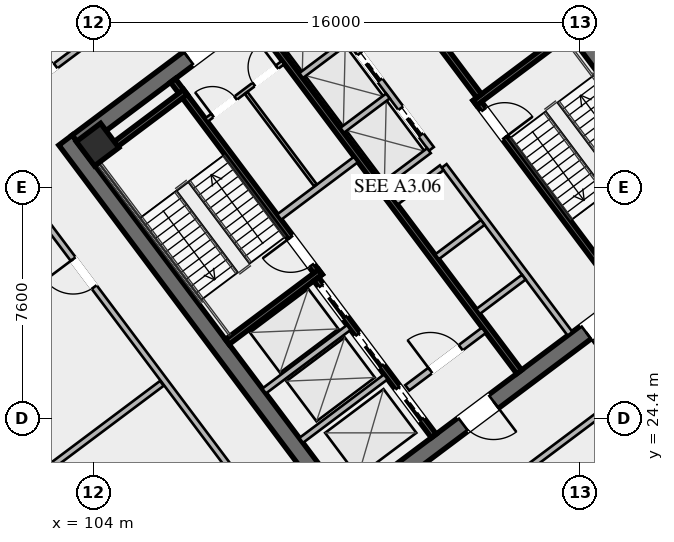
"""IFC4 building model, lengths in metres.
Left out: names, types, materials, properties, quantities, classifications, styles, units other than length and angle.
Written with IfcOpenShell. Run it as: python <this file> out.ifc"""

import sys

from ifc_helpers import new_model, si_unit, direction, frame, frame_2d, origin, origin_2d, place, context, subcontext, project, spatial, rectangle, hollow_rectangle, extrude, element, fill, save


model = new_model("IFC4")
c1 = context("Model", 3, precision=1e-05, world=origin(), true_north=direction((0.0, 1.0)))
c2 = subcontext(c1, "Body", "Model", "MODEL_VIEW")
j1 = project(units=[si_unit("LENGTHUNIT", "METRE"), si_unit("PLANEANGLEUNIT", "RADIAN")], contexts=[c1])
p1 = place(None, origin())
s1 = spatial("IfcSite", under=j1, at=p1, CompositionType="ELEMENT")
p2 = place(p1, origin())
s2 = spatial("IfcBuilding", under=s1, at=p2, CompositionType="ELEMENT")
p3 = place(p2, frame((0.0, 0.0, 109.8)))
s3 = spatial("IfcBuildingStorey", under=s2, at=p3, CompositionType="ELEMENT", Elevation=109.8)
for number, where, z_axis, x_axis in (
    (1, (112.436, 21.077, 0.0), (0.0, 0.0, 1.0), (-0.6, 0.8, 0.0)),
    (2, (115.564, 42.923, 0.0), (0.0, 0.0, 1.0), (0.6, -0.8, 0.0)),
):
    element("IfcWall", number, at=place(p3, frame(where, z_axis=z_axis, x_axis=x_axis)), inside=s3, PredefinedType="SHEAR", context=c2, shape_type="SweptSolid", body=[
        extrude(rectangle(XDim=15.6, YDim=0.55, at=frame_2d((7.8, 0.0))), origin(), (0.0, 0.0, 1.0), 4.6),
    ])
p4 = place(p3, frame((124.539, 30.498, 0.0), z_axis=(0.0, 0.0, 1.0), x_axis=(-0.799998054672, -0.600002593761, 0.0)))
e3 = element("IfcWall", 3, at=p4, inside=s3, PredefinedType="SHEAR", context=c2, shape_type="SweptSolid", body=[
    extrude(rectangle(XDim=15.06, YDim=0.55, at=frame_2d((7.53, 0.0))), origin(), (0.0, 0.0, 1.0), 4.6),
])
p5 = place(p4, frame((9.23, 0.0, 0.0)))
e4 = element("IfcOpeningElement", 4, at=p5, cuts=e3, PredefinedType="OPENING", context=c2, shape_type="SweptSolid", body=[
    extrude(rectangle(XDim=1.25, YDim=2.25, at=frame_2d((0.625, 1.125))), frame((0.0, 0.285, 0.0), z_axis=(0.0, -1.0, 0.0), x_axis=(1.0, 0.0, 0.0)), (0.0, 0.0, 1.0), 0.57),
])
p6 = place(p4, frame((4.18, 0.0, 0.0)))
e5 = element("IfcOpeningElement", 5, at=p6, cuts=e3, PredefinedType="OPENING", context=c2, shape_type="SweptSolid", body=[
    extrude(rectangle(XDim=1.25, YDim=2.25, at=frame_2d((0.625, 1.125))), frame((0.0, 0.285, 0.0), z_axis=(0.0, -1.0, 0.0), x_axis=(1.0, 0.0, 0.0)), (0.0, 0.0, 1.0), 0.57),
])
p7 = place(p3, frame((103.461, 33.502, 0.0), z_axis=(0.0, 0.0, 1.0), x_axis=(0.799998054672, 0.600002593761, 0.0)))
e6 = element("IfcWall", 6, at=p7, inside=s3, PredefinedType="SHEAR", context=c2, shape_type="SweptSolid", body=[
    extrude(rectangle(XDim=15.06, YDim=0.55, at=frame_2d((7.53, 0.0))), origin(), (0.0, 0.0, 1.0), 4.6),
])
p8 = place(p7, frame((4.58, 0.0, 0.0)))
e7 = element("IfcOpeningElement", 7, at=p8, cuts=e6, PredefinedType="OPENING", context=c2, shape_type="SweptSolid", body=[
    extrude(rectangle(XDim=1.25, YDim=2.25, at=frame_2d((0.625, 1.125))), frame((0.0, 0.285, 0.0), z_axis=(0.0, -1.0, 0.0), x_axis=(1.0, 0.0, 0.0)), (0.0, 0.0, 1.0), 0.57),
])
p9 = place(p7, frame((9.63, 0.0, 0.0)))
e8 = element("IfcOpeningElement", 8, at=p9, cuts=e6, PredefinedType="OPENING", context=c2, shape_type="SweptSolid", body=[
    extrude(rectangle(XDim=1.25, YDim=2.25, at=frame_2d((0.625, 1.125))), frame((0.0, 0.285, 0.0), z_axis=(0.0, -1.0, 0.0), x_axis=(1.0, 0.0, 0.0)), (0.0, 0.0, 1.0), 0.57),
])
p10 = place(p3, frame((104.13, 33.41, 0.0), z_axis=(0.0, 0.0, 1.0), x_axis=(0.799999996291, 0.600000004945, 0.0)))
e9 = element("IfcColumn", 9, at=p10, inside=s3, PredefinedType="COLUMN", context=c2, shape_type="SweptSolid", body=[
    extrude(hollow_rectangle(XDim=1.0, YDim=1.0, WallThickness=0.04, at=origin_2d()), origin(), (0.0, 0.0, 1.0), 4.42),
])
for number, where, z_axis, x_axis in (
    (10, (137.672, 26.904, 0.0), (0.0, 0.0, 1.0), (-0.8, -0.6, 0.0)),
    (11, (108.904, 8.328, 0.0), (0.0, 0.0, 1.0), (-0.6, 0.8, 0.0)),
    (12, (119.096, 55.672, 0.0), (0.0, 0.0, 1.0), (0.6, -0.8, 0.0)),
):
    element("IfcWall", number, at=place(p3, frame(where, z_axis=z_axis, x_axis=x_axis)), inside=s3, PredefinedType="SOLIDWALL", context=c2, shape_type="SweptSolid", body=[
        extrude(rectangle(XDim=31.76, YDim=0.28, at=frame_2d((15.88, 0.0))), origin(), (0.0, 0.0, 1.0), 4.42),
    ])
p11 = place(p3, frame((111.44, 29.08, 0.0), z_axis=(0.0, 0.0, 1.0), x_axis=(-0.59999029481, 0.8000072788, 0.0)))
e13 = element("IfcWall", 13, at=p11, inside=s3, PredefinedType="SHEAR", context=c2, shape_type="SweptSolid", body=[
    extrude(rectangle(XDim=8.05, YDim=0.2, at=frame_2d((4.025, 0.0))), origin(), (0.0, 0.0, 1.0), 4.42),
])
p12 = place(p11, frame((0.45, 0.0, 0.0)))
e14 = element("IfcOpeningElement", 14, at=p12, cuts=e13, PredefinedType="OPENING", context=c2, shape_type="SweptSolid", body=[
    extrude(rectangle(XDim=1.15, YDim=2.2, at=frame_2d((0.575, 1.1))), frame((0.0, 0.11, 0.0), z_axis=(0.0, -1.0, 0.0), x_axis=(1.0, 0.0, 0.0)), (0.0, 0.0, 1.0), 0.22),
])
for number, where, z_axis, x_axis in (
    (15, (108.396, 26.922, 0.0), (0.0, 0.0, 1.0), (0.8, 0.6, 0.0)),
    (16, (103.956, 32.842, 0.0), (0.0, 0.0, 1.0), (0.8, 0.6, 0.0)),
):
    element("IfcWall", number, at=place(p3, frame(where, z_axis=z_axis, x_axis=x_axis)), inside=s3, PredefinedType="SHEAR", context=c2, shape_type="SweptSolid", body=[
        extrude(rectangle(XDim=3.83, YDim=0.2, at=frame_2d((1.915, 0.0))), origin(), (0.0, 0.0, 1.0), 4.42),
    ])
p13 = place(p3, frame((116.56, 34.92, 0.0), z_axis=(0.0, 0.0, 1.0), x_axis=(0.59999029481, -0.8000072788, 0.0)))
e17 = element("IfcWall", 17, at=p13, inside=s3, PredefinedType="SHEAR", context=c2, shape_type="SweptSolid", body=[
    extrude(rectangle(XDim=8.05, YDim=0.2, at=frame_2d((4.025, 0.0))), origin(), (0.0, 0.0, 1.0), 4.42),
])
p14 = place(p13, frame((0.45, 0.0, 0.0)))
e18 = element("IfcOpeningElement", 18, at=p14, cuts=e17, PredefinedType="OPENING", context=c2, shape_type="SweptSolid", body=[
    extrude(rectangle(XDim=1.15, YDim=2.2, at=frame_2d((0.575, 1.1))), frame((0.0, 0.11, 0.0), z_axis=(0.0, -1.0, 0.0), x_axis=(1.0, 0.0, 0.0)), (0.0, 0.0, 1.0), 0.22),
])
p15 = place(p3, frame((116.54, 34.78, 0.0), z_axis=(0.0, 0.0, 1.0), x_axis=(0.800015298837, 0.599979601008, 0.0)))
e19 = element("IfcWall", 19, at=p15, inside=s3, PredefinedType="SHEAR", context=c2, shape_type="SweptSolid", body=[
    extrude(rectangle(XDim=3.83, YDim=0.2, at=frame_2d((1.915, 0.0))), origin(), (0.0, 0.0, 1.0), 4.42),
])
p16 = place(p3, frame((117.998, 25.936, 0.0), z_axis=(0.0, 0.0, 1.0), x_axis=(-0.600002693989, 0.799997979501, 0.0)))
e20 = element("IfcWall", 20, at=p16, inside=s3, PredefinedType="SHEAR", context=c2, shape_type="SweptSolid", body=[
    extrude(rectangle(XDim=14.5, YDim=0.2, at=frame_2d((7.25, 0.0))), origin(), (0.0, 0.0, 1.0), 4.42),
])
p17 = place(p3, frame((110.104, 31.028, 0.0), z_axis=(0.0, 0.0, 1.0), x_axis=(0.800018601094, 0.59997519774, 0.0)))
e21 = element("IfcWall", 21, at=p17, inside=s3, PredefinedType="SOLIDWALL", context=c2, shape_type="SweptSolid", body=[
    extrude(rectangle(XDim=3.15, YDim=0.22, at=frame_2d((1.575, 0.0))), origin(), (0.0, 0.0, 1.0), 3.531),
])
p18 = place(p3, frame((114.316, 25.412, 0.0), z_axis=(0.0, 0.0, 1.0), x_axis=(0.800018601094, 0.59997519774, 0.0)))
e22 = element("IfcWall", 22, at=p18, inside=s3, PredefinedType="SOLIDWALL", context=c2, shape_type="SweptSolid", body=[
    extrude(rectangle(XDim=3.15, YDim=0.22, at=frame_2d((1.575, 0.0))), origin(), (0.0, 0.0, 1.0), 3.531),
])
p19 = place(p18, frame((0.95, 0.0, 0.0)))
e23 = element("IfcOpeningElement", 23, at=p19, cuts=e22, PredefinedType="OPENING", context=c2, shape_type="SweptSolid", body=[
    extrude(rectangle(XDim=1.25, YDim=2.25, at=frame_2d((0.625, 1.125))), frame((0.0, 0.12, 0.0), z_axis=(0.0, -1.0, 0.0), x_axis=(1.0, 0.0, 0.0)), (0.0, 0.0, 1.0), 0.24),
])
p20 = place(p3, frame((115.19, 23.83, 0.0), z_axis=(0.0, 0.0, 1.0), x_axis=(-0.599993943644, 0.800004542231, 0.0)))
e24 = element("IfcWall", 24, at=p20, inside=s3, PredefinedType="SHEAR", context=c2, shape_type="SweptSolid", body=[
    extrude(rectangle(XDim=6.45, YDim=0.2, at=frame_2d((3.225, 0.0))), origin(), (0.0, 0.0, 1.0), 4.42),
])
p21 = place(p20, frame((4.875, 0.0, 0.0)))
e25 = element("IfcOpeningElement", 25, at=p21, cuts=e24, PredefinedType="OPENING", context=c2, shape_type="SweptSolid", body=[
    extrude(rectangle(XDim=1.3, YDim=2.25, at=frame_2d((0.65, 1.125))), frame((0.0, 0.11, 0.0), z_axis=(0.0, -1.0, 0.0), x_axis=(1.0, 0.0, 0.0)), (0.0, 0.0, 1.0), 0.22),
])
p22 = place(p20, frame((2.875, 0.0, 0.0)))
e26 = element("IfcOpeningElement", 26, at=p22, cuts=e24, PredefinedType="OPENING", context=c2, shape_type="SweptSolid", body=[
    extrude(rectangle(XDim=1.3, YDim=2.25, at=frame_2d((0.65, 1.125))), frame((0.0, 0.11, 0.0), z_axis=(0.0, -1.0, 0.0), x_axis=(1.0, 0.0, 0.0)), (0.0, 0.0, 1.0), 0.22),
])
p23 = place(p20, frame((0.675, 0.0, 0.0)))
e27 = element("IfcOpeningElement", 27, at=p23, cuts=e24, PredefinedType="OPENING", context=c2, shape_type="SweptSolid", body=[
    extrude(rectangle(XDim=1.3, YDim=2.25, at=frame_2d((0.65, 1.125))), frame((0.0, 0.11, 0.0), z_axis=(0.0, -1.0, 0.0), x_axis=(1.0, 0.0, 0.0)), (0.0, 0.0, 1.0), 0.22),
])
for number, where, z_axis, x_axis in (
    (28, (110.826, 23.682, 0.0), (0.0, 0.0, 1.0), (0.8, 0.6, 0.0)),
    (29, (109.608, 25.306, 0.0), (0.0, 0.0, 1.0), (0.8, 0.6, 0.0)),
):
    element("IfcWall", number, at=place(p3, frame(where, z_axis=z_axis, x_axis=x_axis)), inside=s3, PredefinedType="SOLIDWALL", context=c2, shape_type="SweptSolid", body=[
        extrude(rectangle(XDim=3.48, YDim=0.2, at=frame_2d((1.74, 0.0))), origin(), (0.0, 0.0, 1.0), 4.42),
    ])
p24 = place(p3, frame((112.81, 40.17, 0.0), z_axis=(0.0, 0.0, 1.0), x_axis=(0.599993943644, -0.800004542231, 0.0)))
e30 = element("IfcWall", 30, at=p24, inside=s3, PredefinedType="SHEAR", context=c2, shape_type="SweptSolid", body=[
    extrude(rectangle(XDim=6.45, YDim=0.2, at=frame_2d((3.225, 0.0))), origin(), (0.0, 0.0, 1.0), 4.42),
])
p25 = place(p3, frame((107.71, 34.22, 0.0), z_axis=(0.0, 0.0, 1.0), x_axis=(0.799981399002, 0.60002480053, 0.0)))
e31 = element("IfcWall", 31, at=p25, inside=s3, PredefinedType="PARTITIONING", context=c2, shape_type="SweptSolid", body=[
    extrude(rectangle(XDim=3.15, YDim=0.135, at=frame_2d((1.575, 0.0))), origin(), (0.0, 0.0, 1.0), 3.531),
])
p26 = place(p25, frame((0.25, 0.0, 0.0)))
e32 = element("IfcOpeningElement", 32, at=p26, cuts=e31, PredefinedType="OPENING", context=c2, shape_type="SweptSolid", body=[
    extrude(rectangle(XDim=0.95, YDim=2.05, at=frame_2d((0.475, 1.025))), frame((0.0, 0.077, 0.0), z_axis=(0.0, -1.0, 0.0), x_axis=(1.0, 0.0, 0.0)), (0.0, 0.0, 1.0), 0.155),
])
p27 = place(p25, frame((1.95, 0.0, 0.0)))
e33 = element("IfcOpeningElement", 33, at=p27, cuts=e31, PredefinedType="OPENING", context=c2, shape_type="SweptSolid", body=[
    extrude(rectangle(XDim=0.95, YDim=2.05, at=frame_2d((0.475, 1.025))), frame((0.0, 0.077, 0.0), z_axis=(0.0, -1.0, 0.0), x_axis=(1.0, 0.0, 0.0)), (0.0, 0.0, 1.0), 0.155),
])
p28 = place(p3, frame((111.296, 32.072, 0.0), z_axis=(0.0, 0.0, 1.0), x_axis=(-0.59995887973, 0.800030838552, 0.0)))
e34 = element("IfcWall", 34, at=p28, inside=s3, PredefinedType="PARTITIONING", context=c2, shape_type="SweptSolid", body=[
    extrude(rectangle(XDim=3.8, YDim=0.11, at=frame_2d((1.9, 0.0))), origin(), (0.0, 0.0, 1.0), 3.531),
])
p29 = place(p3, frame((119.67, 27.19, 0.0), z_axis=(0.0, 0.0, 1.0), x_axis=(-0.599988677396, 0.800008491828, 0.0)))
e35 = element("IfcWall", 35, at=p29, inside=s3, PredefinedType="SOLIDWALL", context=c2, shape_type="SweptSolid", body=[
    extrude(rectangle(XDim=6.9, YDim=0.2, at=frame_2d((3.45, 0.0))), origin(), (0.0, 0.0, 1.0), 4.42),
])
p30 = place(p3, frame((116.646, 27.922, 0.0), z_axis=(0.0, 0.0, 1.0), x_axis=(0.8, 0.6, 0.0)))
e36 = element("IfcWall", 36, at=p30, inside=s3, PredefinedType="SOLIDWALL", context=c2, shape_type="SweptSolid", body=[
    extrude(rectangle(XDim=1.88, YDim=0.2, at=frame_2d((0.94, 0.0))), origin(), (0.0, 0.0, 1.0), 4.42),
])
p31 = place(p3, frame((115.296, 29.722, 0.0), z_axis=(0.0, 0.0, 1.0), x_axis=(0.799984418148, 0.600020775241, 0.0)))
e37 = element("IfcWall", 37, at=p31, inside=s3, PredefinedType="SOLIDWALL", context=c2, shape_type="SweptSolid", body=[
    extrude(rectangle(XDim=1.88, YDim=0.2, at=frame_2d((0.94, 0.0))), origin(), (0.0, 0.0, 1.0), 4.42),
])
p32 = place(p3, frame((113.946, 31.522, 0.0), z_axis=(0.0, 0.0, 1.0), x_axis=(0.8, 0.6, 0.0)))
e38 = element("IfcWall", 38, at=p32, inside=s3, PredefinedType="SOLIDWALL", context=c2, shape_type="SweptSolid", body=[
    extrude(rectangle(XDim=1.88, YDim=0.2, at=frame_2d((0.94, 0.0))), origin(), (0.0, 0.0, 1.0), 4.42),
])
p33 = place(p3, frame((115.11, 33.27, 0.0), z_axis=(0.0, 0.0, 1.0), x_axis=(-0.600011322243, 0.799991508192, 0.0)))
e39 = element("IfcWall", 39, at=p33, inside=s3, PredefinedType="SOLIDWALL", context=c2, shape_type="SweptSolid", body=[
    extrude(rectangle(XDim=6.9, YDim=0.2, at=frame_2d((3.45, 0.0))), origin(), (0.0, 0.0, 1.0), 4.42),
])
p34 = place(p33, frame((0.575, 0.0, 0.0)))
e40 = element("IfcOpeningElement", 40, at=p34, cuts=e39, PredefinedType="OPENING", context=c2, shape_type="SweptSolid", body=[
    extrude(rectangle(XDim=1.1, YDim=2.2, at=frame_2d((0.55, 1.1))), frame((0.0, 0.11, 0.0), z_axis=(0.0, -1.0, 0.0), x_axis=(1.0, 0.0, 0.0)), (0.0, 0.0, 1.0), 0.22),
])
p35 = place(p33, frame((2.825, 0.0, 0.0)))
e41 = element("IfcOpeningElement", 41, at=p35, cuts=e39, PredefinedType="OPENING", context=c2, shape_type="SweptSolid", body=[
    extrude(rectangle(XDim=1.1, YDim=2.2, at=frame_2d((0.55, 1.1))), frame((0.0, 0.11, 0.0), z_axis=(0.0, -1.0, 0.0), x_axis=(1.0, 0.0, 0.0)), (0.0, 0.0, 1.0), 0.22),
])
p36 = place(p33, frame((5.075, 0.0, 0.0)))
e42 = element("IfcOpeningElement", 42, at=p36, cuts=e39, PredefinedType="OPENING", context=c2, shape_type="SweptSolid", body=[
    extrude(rectangle(XDim=1.1, YDim=2.2, at=frame_2d((0.55, 1.1))), frame((0.0, 0.11, 0.0), z_axis=(0.0, -1.0, 0.0), x_axis=(1.0, 0.0, 0.0)), (0.0, 0.0, 1.0), 0.22),
])
p37 = place(p3, frame((113.526, 32.082, 0.0), z_axis=(0.0, 0.0, 1.0), x_axis=(0.800046745961, 0.599937666993, 0.0)))
e43 = element("IfcWall", 43, at=p37, inside=s3, PredefinedType="SOLIDWALL", context=c2, shape_type="SweptSolid", body=[
    extrude(rectangle(XDim=1.88, YDim=0.2, at=frame_2d((0.94, 0.0))), origin(), (0.0, 0.0, 1.0), 4.42),
])
p38 = place(p3, frame((112.176, 33.882, 0.0), z_axis=(0.0, 0.0, 1.0), x_axis=(0.8, 0.6, 0.0)))
e44 = element("IfcWall", 44, at=p38, inside=s3, PredefinedType="SOLIDWALL", context=c2, shape_type="SweptSolid", body=[
    extrude(rectangle(XDim=1.88, YDim=0.2, at=frame_2d((0.94, 0.0))), origin(), (0.0, 0.0, 1.0), 4.42),
])
p39 = place(p3, frame((110.826, 35.682, 0.0), z_axis=(0.0, 0.0, 1.0), x_axis=(0.799984418148, 0.600020775241, 0.0)))
e45 = element("IfcWall", 45, at=p39, inside=s3, PredefinedType="SOLIDWALL", context=c2, shape_type="SweptSolid", body=[
    extrude(rectangle(XDim=1.88, YDim=0.2, at=frame_2d((0.94, 0.0))), origin(), (0.0, 0.0, 1.0), 4.42),
])
p40 = place(p3, frame((100.07, 33.99, 0.0), z_axis=(0.0, 0.0, 1.0), x_axis=(0.8, 0.6, 0.0)))
e46 = element("IfcWall", 46, at=p40, inside=s3, PredefinedType="SOLIDWALL", context=c2, shape_type="SweptSolid", body=[
    extrude(rectangle(XDim=19.9, YDim=0.2, at=frame_2d((9.95, 0.0))), origin(), (0.0, 0.0, 1.0), 3.531),
])
p41 = place(p40, frame((2.2, 0.0, 0.0)))
e47 = element("IfcOpeningElement", 47, at=p41, cuts=e46, PredefinedType="OPENING", context=c2, shape_type="SweptSolid", body=[
    extrude(rectangle(XDim=1.15, YDim=2.2, at=frame_2d((0.575, 1.1))), frame((0.0, 0.11, 0.0), z_axis=(0.0, -1.0, 0.0), x_axis=(1.0, 0.0, 0.0)), (0.0, 0.0, 1.0), 0.22),
])
p42 = place(p3, frame((127.93, 30.01, 0.0), z_axis=(0.0, 0.0, 1.0), x_axis=(-0.8, -0.6, 0.0)))
e48 = element("IfcWall", 48, at=p42, inside=s3, PredefinedType="SOLIDWALL", context=c2, shape_type="SweptSolid", body=[
    extrude(rectangle(XDim=19.9, YDim=0.2, at=frame_2d((9.95, 0.0))), origin(), (0.0, 0.0, 1.0), 3.531),
])
p43 = place(p42, frame((2.2, 0.0, 0.0)))
e49 = element("IfcOpeningElement", 49, at=p43, cuts=e48, PredefinedType="OPENING", context=c2, shape_type="SweptSolid", body=[
    extrude(rectangle(XDim=1.15, YDim=2.2, at=frame_2d((0.575, 1.1))), frame((0.0, 0.11, 0.0), z_axis=(0.0, -1.0, 0.0), x_axis=(1.0, 0.0, 0.0)), (0.0, 0.0, 1.0), 0.22),
])
p44 = place(p3, frame((111.938, 18.166, 0.0), z_axis=(0.0, 0.0, 1.0), x_axis=(-0.59999602618, 0.80000298035, 0.0)))
e50 = element("IfcWall", 50, at=p44, inside=s3, PredefinedType="SOLIDWALL", context=c2, shape_type="SweptSolid", body=[
    extrude(rectangle(XDim=19.66, YDim=0.2, at=frame_2d((9.83, 0.0))), origin(), (0.0, 0.0, 1.0), 3.531),
])
p45 = place(p44, frame((3.0, 0.0, 0.0)))
e51 = element("IfcOpeningElement", 51, at=p45, cuts=e50, PredefinedType="OPENING", context=c2, shape_type="SweptSolid", body=[
    extrude(rectangle(XDim=1.25, YDim=2.25, at=frame_2d((0.625, 1.125))), frame((0.0, 0.11, 0.0), z_axis=(0.0, -1.0, 0.0), x_axis=(1.0, 0.0, 0.0)), (0.0, 0.0, 1.0), 0.22),
])
p46 = place(p44, frame((13.2, 0.0, 0.0)))
e52 = element("IfcOpeningElement", 52, at=p46, cuts=e50, PredefinedType="OPENING", context=c2, shape_type="SweptSolid", body=[
    extrude(rectangle(XDim=1.15, YDim=2.2, at=frame_2d((0.575, 1.1))), frame((0.0, 0.11, 0.0), z_axis=(0.0, -1.0, 0.0), x_axis=(1.0, 0.0, 0.0)), (0.0, 0.0, 1.0), 0.22),
])
p47 = place(p3, frame((99.676, 20.632, 0.0), z_axis=(0.0, 0.0, 1.0), x_axis=(0.799992862991, 0.600009515894, 0.0)))
e53 = element("IfcWall", 53, at=p47, inside=s3, PredefinedType="SOLIDWALL", context=c2, shape_type="SweptSolid", body=[
    extrude(rectangle(XDim=8.21, YDim=0.2, at=frame_2d((4.105, 0.0))), origin(), (0.0, 0.0, 1.0), 3.531),
])
p48 = place(p8, origin())
e54 = element("IfcDoor", 54, at=p48, inside=s3, OperationType="SINGLE_SWING_LEFT", PredefinedType="DOOR", context=c2, shape_type="SweptSolid", body=[
    extrude(rectangle(XDim=1.25, YDim=2.25, at=frame_2d((0.625, 1.125))), frame((0.0, 0.025, 0.0), z_axis=(0.0, -1.0, 0.0), x_axis=(1.0, 0.0, 0.0)), (0.0, 0.0, 1.0), 0.05),
])
fill(e7, e54)
p49 = place(p5, origin())
e55 = element("IfcDoor", 55, at=p49, inside=s3, OperationType="SINGLE_SWING_LEFT", PredefinedType="DOOR", context=c2, shape_type="SweptSolid", body=[
    extrude(rectangle(XDim=1.25, YDim=2.25, at=frame_2d((0.625, 1.125))), frame((0.0, 0.025, 0.0), z_axis=(0.0, -1.0, 0.0), x_axis=(1.0, 0.0, 0.0)), (0.0, 0.0, 1.0), 0.05),
])
fill(e4, e55)
p50 = place(p6, origin())
e56 = element("IfcDoor", 56, at=p50, inside=s3, OperationType="SINGLE_SWING_RIGHT", PredefinedType="DOOR", context=c2, shape_type="SweptSolid", body=[
    extrude(rectangle(XDim=1.25, YDim=2.25, at=frame_2d((0.625, 1.125))), frame((0.0, 0.025, 0.0), z_axis=(0.0, -1.0, 0.0), x_axis=(1.0, 0.0, 0.0)), (0.0, 0.0, 1.0), 0.05),
])
fill(e5, e56)
p51 = place(p12, origin())
e57 = element("IfcDoor", 57, at=p51, inside=s3, OperationType="SINGLE_SWING_RIGHT", PredefinedType="DOOR", context=c2, shape_type="SweptSolid", body=[
    extrude(rectangle(XDim=1.15, YDim=2.2, at=frame_2d((0.575, 1.1))), frame((0.0, 0.025, 0.0), z_axis=(0.0, -1.0, 0.0), x_axis=(1.0, 0.0, 0.0)), (0.0, 0.0, 1.0), 0.05),
])
fill(e14, e57)
p52 = place(p14, origin())
e58 = element("IfcDoor", 58, at=p52, inside=s3, OperationType="SINGLE_SWING_RIGHT", PredefinedType="DOOR", context=c2, shape_type="SweptSolid", body=[
    extrude(rectangle(XDim=1.15, YDim=2.2, at=frame_2d((0.575, 1.1))), frame((0.0, 0.025, 0.0), z_axis=(0.0, -1.0, 0.0), x_axis=(1.0, 0.0, 0.0)), (0.0, 0.0, 1.0), 0.05),
])
fill(e18, e58)
p53 = place(p19, origin())
e59 = element("IfcDoor", 59, at=p53, inside=s3, OperationType="SINGLE_SWING_LEFT", PredefinedType="DOOR", context=c2, shape_type="SweptSolid", body=[
    extrude(rectangle(XDim=1.25, YDim=2.25, at=frame_2d((0.625, 1.125))), frame((0.0, 0.025, 0.0), z_axis=(0.0, -1.0, 0.0), x_axis=(1.0, 0.0, 0.0)), (0.0, 0.0, 1.0), 0.05),
])
fill(e23, e59)
p54 = place(p26, origin())
e60 = element("IfcDoor", 60, at=p54, inside=s3, OperationType="SINGLE_SWING_LEFT", PredefinedType="DOOR", context=c2, shape_type="SweptSolid", body=[
    extrude(rectangle(XDim=0.95, YDim=2.05, at=frame_2d((0.475, 1.025))), frame((0.0, 0.025, 0.0), z_axis=(0.0, -1.0, 0.0), x_axis=(1.0, 0.0, 0.0)), (0.0, 0.0, 1.0), 0.05),
])
fill(e32, e60)
p55 = place(p27, origin())
e61 = element("IfcDoor", 61, at=p55, inside=s3, OperationType="SINGLE_SWING_RIGHT", PredefinedType="DOOR", context=c2, shape_type="SweptSolid", body=[
    extrude(rectangle(XDim=0.95, YDim=2.05, at=frame_2d((0.475, 1.025))), frame((0.0, 0.025, 0.0), z_axis=(0.0, -1.0, 0.0), x_axis=(1.0, 0.0, 0.0)), (0.0, 0.0, 1.0), 0.05),
])
fill(e33, e61)
p56 = place(p41, origin())
e62 = element("IfcDoor", 62, at=p56, inside=s3, OperationType="SINGLE_SWING_LEFT", PredefinedType="DOOR", context=c2, shape_type="SweptSolid", body=[
    extrude(rectangle(XDim=1.15, YDim=2.2, at=frame_2d((0.575, 1.1))), frame((0.0, 0.025, 0.0), z_axis=(0.0, -1.0, 0.0), x_axis=(1.0, 0.0, 0.0)), (0.0, 0.0, 1.0), 0.05),
])
fill(e47, e62)
p57 = place(p46, origin())
e63 = element("IfcDoor", 63, at=p57, inside=s3, OperationType="SINGLE_SWING_RIGHT", PredefinedType="DOOR", context=c2, shape_type="SweptSolid", body=[
    extrude(rectangle(XDim=1.15, YDim=2.2, at=frame_2d((0.575, 1.1))), frame((0.0, 0.025, 0.0), z_axis=(0.0, -1.0, 0.0), x_axis=(1.0, 0.0, 0.0)), (0.0, 0.0, 1.0), 0.05),
])
fill(e52, e63)
p58 = place(p21, origin())
e64 = element("IfcDoor", 64, at=p58, inside=s3, OperationType="SLIDING_TO_LEFT", PredefinedType="DOOR", context=c2, shape_type="SweptSolid", body=[
    extrude(rectangle(XDim=1.3, YDim=2.25, at=frame_2d((0.65, 1.125))), frame((0.0, 0.025, 0.0), z_axis=(0.0, -1.0, 0.0), x_axis=(1.0, 0.0, 0.0)), (0.0, 0.0, 1.0), 0.05),
])
fill(e25, e64)
p59 = place(p22, origin())
e65 = element("IfcDoor", 65, at=p59, inside=s3, OperationType="SLIDING_TO_LEFT", PredefinedType="DOOR", context=c2, shape_type="SweptSolid", body=[
    extrude(rectangle(XDim=1.3, YDim=2.25, at=frame_2d((0.65, 1.125))), frame((0.0, 0.025, 0.0), z_axis=(0.0, -1.0, 0.0), x_axis=(1.0, 0.0, 0.0)), (0.0, 0.0, 1.0), 0.05),
])
fill(e26, e65)
p60 = place(p23, origin())
e66 = element("IfcDoor", 66, at=p60, inside=s3, OperationType="SLIDING_TO_LEFT", PredefinedType="DOOR", context=c2, shape_type="SweptSolid", body=[
    extrude(rectangle(XDim=1.3, YDim=2.25, at=frame_2d((0.65, 1.125))), frame((0.0, 0.025, 0.0), z_axis=(0.0, -1.0, 0.0), x_axis=(1.0, 0.0, 0.0)), (0.0, 0.0, 1.0), 0.05),
])
fill(e27, e66)
p61 = place(p34, origin())
e67 = element("IfcDoor", 67, at=p61, inside=s3, OperationType="SLIDING_TO_LEFT", PredefinedType="DOOR", context=c2, shape_type="SweptSolid", body=[
    extrude(rectangle(XDim=1.1, YDim=2.2, at=frame_2d((0.55, 1.1))), frame((0.0, 0.025, 0.0), z_axis=(0.0, -1.0, 0.0), x_axis=(1.0, 0.0, 0.0)), (0.0, 0.0, 1.0), 0.05),
])
fill(e40, e67)
p62 = place(p35, origin())
e68 = element("IfcDoor", 68, at=p62, inside=s3, OperationType="SLIDING_TO_LEFT", PredefinedType="DOOR", context=c2, shape_type="SweptSolid", body=[
    extrude(rectangle(XDim=1.1, YDim=2.2, at=frame_2d((0.55, 1.1))), frame((0.0, 0.025, 0.0), z_axis=(0.0, -1.0, 0.0), x_axis=(1.0, 0.0, 0.0)), (0.0, 0.0, 1.0), 0.05),
])
fill(e41, e68)
save(model, sys.argv[1])
